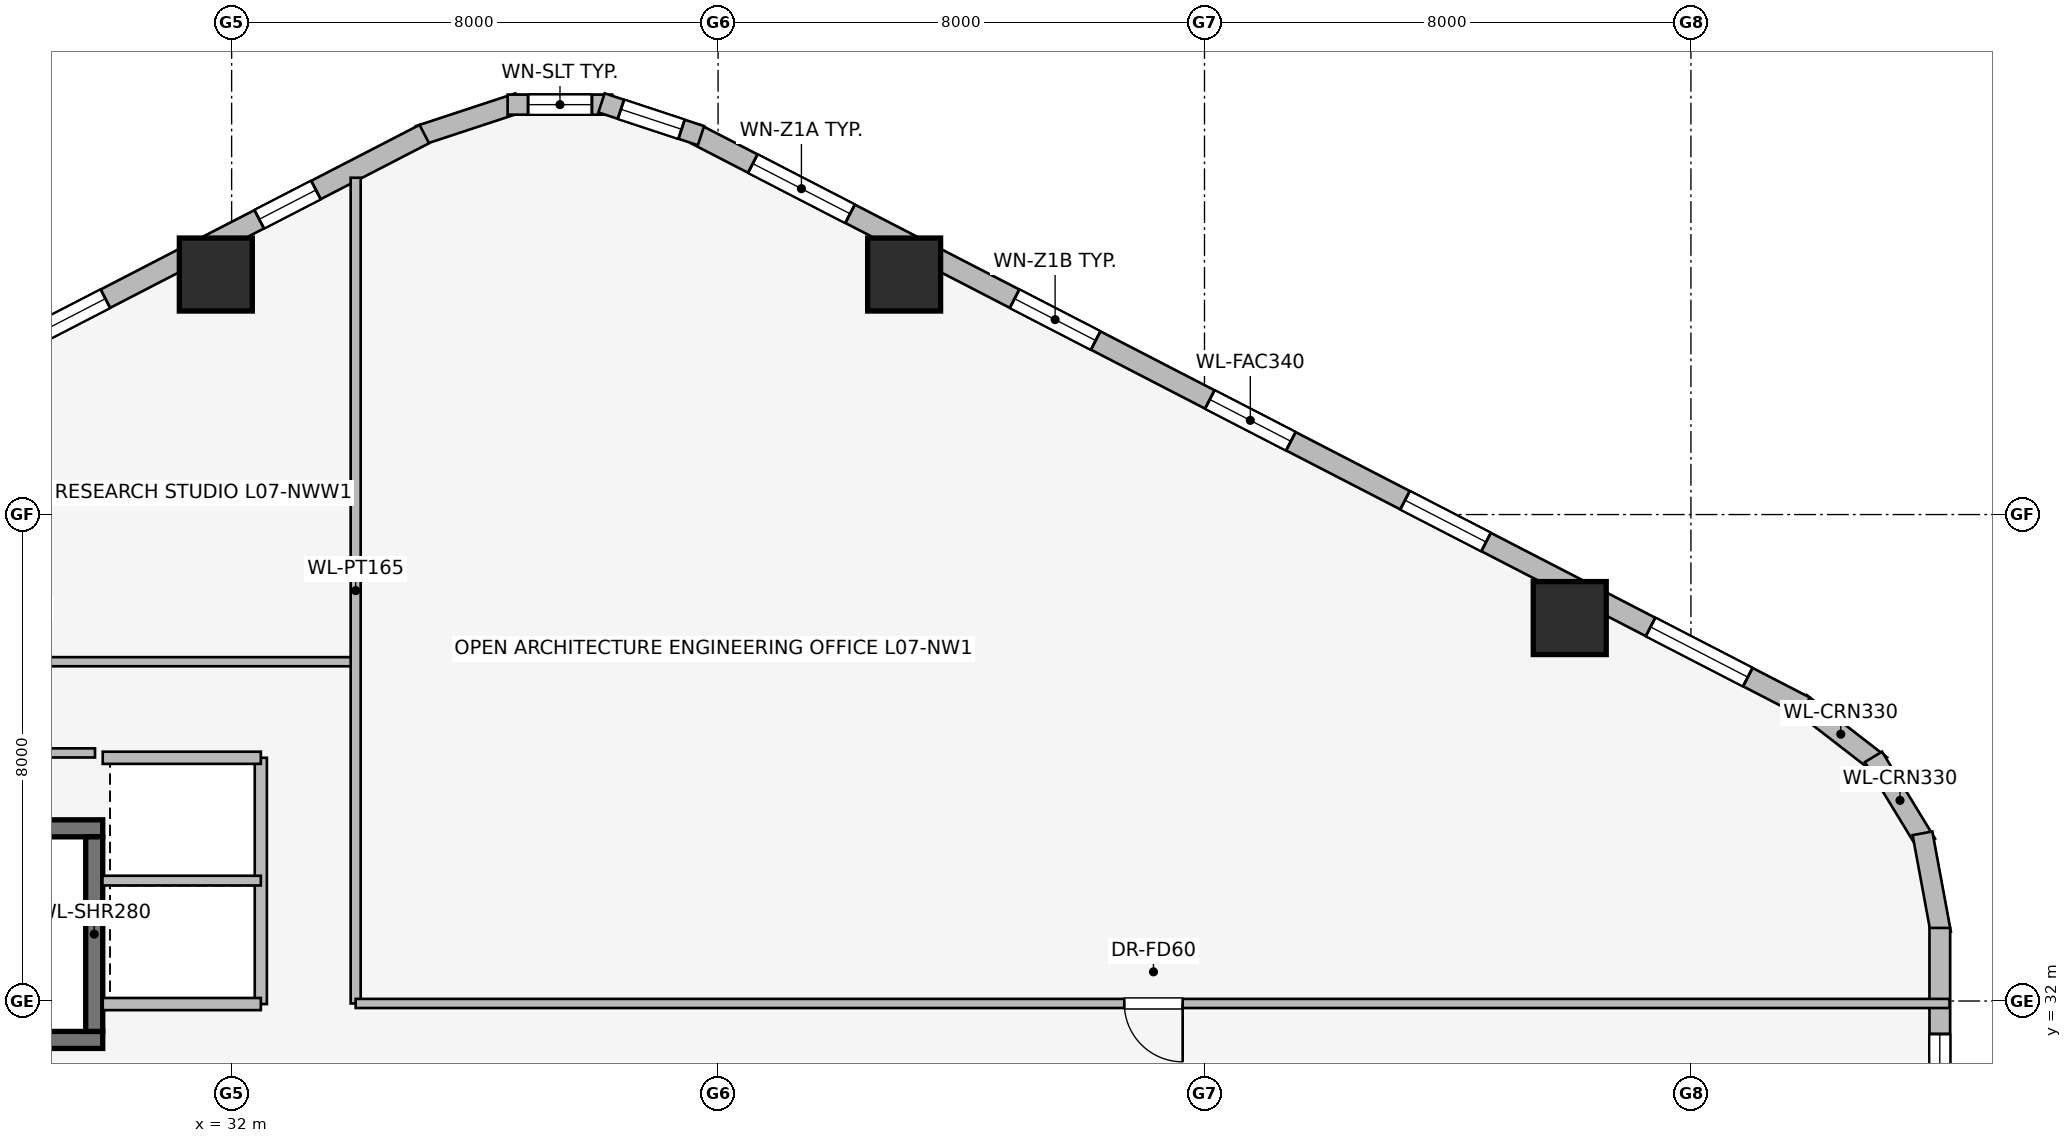
"""IFC4 building model, lengths in metres.
Left out: names, types, materials, properties, quantities, classifications, styles, units other than length and angle.
Written with IfcOpenShell. Run it as: python <this file> out.ifc"""

import sys

from ifc_helpers import new_model, si_unit, direction, frame, frame_2d, origin, origin_2d, place, context, subcontext, project, spatial, rectangle, extrude, element, fill, save


model = new_model("IFC4")
c1 = context("Model", 3, precision=1e-05, world=origin(), true_north=direction((0.0, 1.0)))
c2 = subcontext(c1, "Body", "Model", "MODEL_VIEW")
j1 = project(units=[si_unit("LENGTHUNIT", "METRE"), si_unit("PLANEANGLEUNIT", "RADIAN")], contexts=[c1])
p1 = place(None, origin())
s1 = spatial("IfcSite", under=j1, at=p1, CompositionType="ELEMENT")
p2 = place(p1, origin())
s2 = spatial("IfcBuilding", under=s1, at=p2, CompositionType="ELEMENT")
p3 = place(p2, frame((0.0, 0.0, 30.65)))
s3 = spatial("IfcBuildingStorey", under=s2, at=p3, CompositionType="ELEMENT", Elevation=30.65)
p4 = place(p3, frame((21.52, 31.36, 0.0), z_axis=(0.0, 0.0, 1.0), x_axis=(1.0, 0.0, 0.0)))
e1 = element("IfcWall", 1, at=p4, inside=s3, PredefinedType="SHEAR", context=c2, shape_type="SweptSolid", body=[
    extrude(rectangle(XDim=8.36, YDim=0.28, at=frame_2d((4.18, 0.0))), origin(), (0.0, 0.0, 1.0), 3.65),
])
p5 = place(p4, frame((0.45, 0.0, 0.0)))
e2 = element("IfcOpeningElement", 2, at=p5, cuts=e1, PredefinedType="OPENING", context=c2, shape_type="SweptSolid", body=[
    extrude(rectangle(XDim=1.05, YDim=2.0, at=frame_2d((0.525, 1.0))), frame((0.0, 0.15, 0.0), z_axis=(0.0, -1.0, 0.0), x_axis=(1.0, 0.0, 0.0)), (0.0, 0.0, 1.0), 0.3),
])
p6 = place(p3, frame((29.88, 34.84, 0.0), z_axis=(0.0, 0.0, 1.0), x_axis=(-1.0, 0.0, 0.0)))
e3 = element("IfcWall", 3, at=p6, inside=s3, PredefinedType="SHEAR", context=c2, shape_type="SweptSolid", body=[
    extrude(rectangle(XDim=8.36, YDim=0.28, at=frame_2d((4.18, 0.0))), origin(), (0.0, 0.0, 1.0), 3.65),
])
p7 = place(p3, frame((29.74, 31.5, 0.0), z_axis=(0.0, 0.0, 1.0), x_axis=(0.0, 1.0, 0.0)))
e4 = element("IfcWall", 4, at=p7, inside=s3, PredefinedType="SHEAR", context=c2, shape_type="SweptSolid", body=[
    extrude(rectangle(XDim=3.2, YDim=0.28, at=frame_2d((1.6, 0.0))), origin(), (0.0, 0.0, 1.0), 3.65),
])
for number, where, z_axis, x_axis in (
    (5, (54.007, 38.298, 0.0), (0.0, 0.0, 1.0), (1.0, 0.0, 0.0)),
    (6, (43.06, 43.947, 0.0), (0.0, 0.0, 1.0), (1.0, 0.0, 0.0)),
    (7, (31.74, 43.947, 0.0), (0.0, 0.0, 1.0), (1.0, 0.0, 0.0)),
):
    element("IfcColumn", number, at=place(p3, frame(where, z_axis=z_axis, x_axis=x_axis)), inside=s3, PredefinedType="COLUMN", context=c2, shape_type="SweptSolid", body=[
        extrude(rectangle(XDim=1.2, YDim=1.2, at=origin_2d()), origin(), (0.0, 0.0, 1.0), 3.65),
    ])
p8 = place(p3, frame((57.802, 36.901, 0.0), z_axis=(0.0, 0.0, 1.0), x_axis=(0.790691856293, -0.61221433207, 0.0)))
e8 = element("IfcWall", 8, at=p8, inside=s3, PredefinedType="STANDARD", context=c2, shape_type="SweptSolid", body=[
    extrude(rectangle(XDim=1.676, YDim=0.33, at=frame_2d((0.838, 0.0))), origin(), (0.0, 0.0, 1.0), 3.39),
])
p9 = place(p3, frame((59.002, 36.015, 0.0), z_axis=(0.0, 0.0, 1.0), x_axis=(0.520584129191, -0.853810379671, 0.0)))
e9 = element("IfcWall", 9, at=p9, inside=s3, PredefinedType="STANDARD", context=c2, shape_type="SweptSolid", body=[
    extrude(rectangle(XDim=1.677, YDim=0.33, at=frame_2d((0.838, 0.0))), origin(), (0.0, 0.0, 1.0), 3.39),
])
p10 = place(p3, frame((59.808, 34.758, 0.0), z_axis=(0.0, 0.0, 1.0), x_axis=(0.181714143354, -0.983351397063, 0.0)))
e10 = element("IfcWall", 10, at=p10, inside=s3, PredefinedType="STANDARD", context=c2, shape_type="SweptSolid", body=[
    extrude(rectangle(XDim=1.678, YDim=0.33, at=frame_2d((0.839, 0.0))), origin(), (0.0, 0.0, 1.0), 3.39),
])
p11 = place(p3, frame((39.631, 46.257, 0.0), z_axis=(0.0, 0.0, 1.0), x_axis=(0.888634413993, -0.458616264721, 0.0)))
e11 = element("IfcWall", 11, at=p11, inside=s3, PredefinedType="STANDARD", context=c2, shape_type="SweptSolid", body=[
    extrude(rectangle(XDim=20.531, YDim=0.34, at=frame_2d((10.266, 0.0))), origin(), (0.0, 0.0, 1.0), 2.684),
])
p12 = place(p11, frame((1.058, 0.0, 0.75)))
e12 = element("IfcOpeningElement", 12, at=p12, cuts=e11, PredefinedType="OPENING", context=c2, shape_type="SweptSolid", body=[
    extrude(rectangle(XDim=1.8, YDim=1.5, at=frame_2d((0.9, 0.75))), frame((0.0, 0.18, 0.0), z_axis=(0.0, -1.0, 0.0), x_axis=(1.0, 0.0, 0.0)), (0.0, 0.0, 1.0), 0.36),
])
p13 = place(p11, frame((5.903, 0.0, 0.75)))
e13 = element("IfcOpeningElement", 13, at=p13, cuts=e11, PredefinedType="OPENING", context=c2, shape_type="SweptSolid", body=[
    extrude(rectangle(XDim=1.5, YDim=1.5, at=frame_2d((0.75, 0.75))), frame((0.0, 0.18, 0.0), z_axis=(0.0, -1.0, 0.0), x_axis=(1.0, 0.0, 0.0)), (0.0, 0.0, 1.0), 0.36),
])
p14 = place(p11, frame((9.516, 0.0, 0.75)))
e14 = element("IfcOpeningElement", 14, at=p14, cuts=e11, PredefinedType="OPENING", context=c2, shape_type="SweptSolid", body=[
    extrude(rectangle(XDim=1.5, YDim=1.5, at=frame_2d((0.75, 0.75))), frame((0.0, 0.18, 0.0), z_axis=(0.0, -1.0, 0.0), x_axis=(1.0, 0.0, 0.0)), (0.0, 0.0, 1.0), 0.36),
])
p15 = place(p11, frame((13.129, 0.0, 0.75)))
e15 = element("IfcOpeningElement", 15, at=p15, cuts=e11, PredefinedType="OPENING", context=c2, shape_type="SweptSolid", body=[
    extrude(rectangle(XDim=1.5, YDim=1.5, at=frame_2d((0.75, 0.75))), frame((0.0, 0.18, 0.0), z_axis=(0.0, -1.0, 0.0), x_axis=(1.0, 0.0, 0.0)), (0.0, 0.0, 1.0), 0.36),
])
p16 = place(p11, frame((17.673, 0.0, 0.75)))
e16 = element("IfcOpeningElement", 16, at=p16, cuts=e11, PredefinedType="OPENING", context=c2, shape_type="SweptSolid", body=[
    extrude(rectangle(XDim=1.8, YDim=1.5, at=frame_2d((0.9, 0.75))), frame((0.0, 0.18, 0.0), z_axis=(0.0, -1.0, 0.0), x_axis=(1.0, 0.0, 0.0)), (0.0, 0.0, 1.0), 0.36),
])
p17 = place(p3, frame((35.081, 46.231, 0.0), z_axis=(0.0, 0.0, 1.0), x_axis=(0.94976901097, 0.312951794691, 0.0)))
e17 = element("IfcWall", 17, at=p17, inside=s3, PredefinedType="STANDARD", context=c2, shape_type="SweptSolid", body=[
    extrude(rectangle(XDim=1.722, YDim=0.33, at=frame_2d((0.861, 0.0))), origin(), (0.0, 0.0, 1.0), 3.39),
])
p18 = place(p3, frame((36.539, 46.741, 0.0), z_axis=(0.0, 0.0, 1.0), x_axis=(1.0, 0.0, 0.0)))
e18 = element("IfcWall", 18, at=p18, inside=s3, PredefinedType="STANDARD", context=c2, shape_type="SweptSolid", body=[
    extrude(rectangle(XDim=1.722, YDim=0.33, at=frame_2d((0.861, 0.0))), origin(), (0.0, 0.0, 1.0), 3.39),
])
p19 = place(p18, frame((0.336, 0.0, 0.75)))
e19 = element("IfcOpeningElement", 19, at=p19, cuts=e18, PredefinedType="OPENING", context=c2, shape_type="SweptSolid", body=[
    extrude(rectangle(XDim=1.05, YDim=1.4, at=frame_2d((0.525, 0.7))), frame((0.0, 0.175, 0.0), z_axis=(0.0, -1.0, 0.0), x_axis=(1.0, 0.0, 0.0)), (0.0, 0.0, 1.0), 0.35),
])
p20 = place(p3, frame((38.083, 46.77, 0.0), z_axis=(0.0, 0.0, 1.0), x_axis=(0.94976901097, -0.312951794691, 0.0)))
e20 = element("IfcWall", 20, at=p20, inside=s3, PredefinedType="STANDARD", context=c2, shape_type="SweptSolid", body=[
    extrude(rectangle(XDim=1.722, YDim=0.33, at=frame_2d((0.861, 0.0))), origin(), (0.0, 0.0, 1.0), 3.39),
])
p21 = place(p20, frame((0.336, 0.0, 0.75)))
e21 = element("IfcOpeningElement", 21, at=p21, cuts=e20, PredefinedType="OPENING", context=c2, shape_type="SweptSolid", body=[
    extrude(rectangle(XDim=1.05, YDim=1.4, at=frame_2d((0.525, 0.7))), frame((0.0, 0.175, 0.0), z_axis=(0.0, -1.0, 0.0), x_axis=(1.0, 0.0, 0.0)), (0.0, 0.0, 1.0), 0.35),
])
p22 = place(p3, frame((16.924, 36.841, 0.0), z_axis=(0.0, 0.0, 1.0), x_axis=(0.888634413993, 0.458616264721, 0.0)))
e22 = element("IfcWall", 22, at=p22, inside=s3, PredefinedType="STANDARD", context=c2, shape_type="SweptSolid", body=[
    extrude(rectangle(XDim=20.531, YDim=0.34, at=frame_2d((10.266, 0.0))), origin(), (0.0, 0.0, 1.0), 2.684),
])
p23 = place(p22, frame((2.161, 0.0, 0.75)))
e23 = element("IfcOpeningElement", 23, at=p23, cuts=e22, PredefinedType="OPENING", context=c2, shape_type="SweptSolid", body=[
    extrude(rectangle(XDim=1.05, YDim=1.4, at=frame_2d((0.525, 0.7))), frame((0.0, 0.18, 0.0), z_axis=(0.0, -1.0, 0.0), x_axis=(1.0, 0.0, 0.0)), (0.0, 0.0, 1.0), 0.36),
])
p24 = place(p22, frame((5.903, 0.0, 0.75)))
e24 = element("IfcOpeningElement", 24, at=p24, cuts=e22, PredefinedType="OPENING", context=c2, shape_type="SweptSolid", body=[
    extrude(rectangle(XDim=1.5, YDim=1.5, at=frame_2d((0.75, 0.75))), frame((0.0, 0.18, 0.0), z_axis=(0.0, -1.0, 0.0), x_axis=(1.0, 0.0, 0.0)), (0.0, 0.0, 1.0), 0.36),
])
p25 = place(p22, frame((9.516, 0.0, 0.75)))
e25 = element("IfcOpeningElement", 25, at=p25, cuts=e22, PredefinedType="OPENING", context=c2, shape_type="SweptSolid", body=[
    extrude(rectangle(XDim=1.5, YDim=1.5, at=frame_2d((0.75, 0.75))), frame((0.0, 0.18, 0.0), z_axis=(0.0, -1.0, 0.0), x_axis=(1.0, 0.0, 0.0)), (0.0, 0.0, 1.0), 0.36),
])
p26 = place(p22, frame((13.129, 0.0, 0.75)))
e26 = element("IfcOpeningElement", 26, at=p26, cuts=e22, PredefinedType="OPENING", context=c2, shape_type="SweptSolid", body=[
    extrude(rectangle(XDim=1.5, YDim=1.5, at=frame_2d((0.75, 0.75))), frame((0.0, 0.18, 0.0), z_axis=(0.0, -1.0, 0.0), x_axis=(1.0, 0.0, 0.0)), (0.0, 0.0, 1.0), 0.36),
])
p27 = place(p22, frame((17.476, 0.0, 0.75)))
e27 = element("IfcOpeningElement", 27, at=p27, cuts=e22, PredefinedType="OPENING", context=c2, shape_type="SweptSolid", body=[
    extrude(rectangle(XDim=1.05, YDim=1.4, at=frame_2d((0.525, 0.7))), frame((0.0, 0.18, 0.0), z_axis=(0.0, -1.0, 0.0), x_axis=(1.0, 0.0, 0.0)), (0.0, 0.0, 1.0), 0.36),
])
p28 = place(p3, frame((60.093, 33.202, 0.0), z_axis=(0.0, 0.0, 1.0), x_axis=(0.0, -1.0, 0.0)))
e28 = element("IfcWall", 28, at=p28, inside=s3, PredefinedType="STANDARD", context=c2, shape_type="SweptSolid", body=[
    extrude(rectangle(XDim=18.404, YDim=0.34, at=frame_2d((9.202, 0.0))), origin(), (0.0, 0.0, 1.0), 2.684),
])
p29 = place(p28, frame((1.744, 0.0, 0.75)))
e29 = element("IfcOpeningElement", 29, at=p29, cuts=e28, PredefinedType="OPENING", context=c2, shape_type="SweptSolid", body=[
    extrude(rectangle(XDim=1.05, YDim=1.4, at=frame_2d((0.525, 0.7))), frame((0.0, 0.18, 0.0), z_axis=(0.0, -1.0, 0.0), x_axis=(1.0, 0.0, 0.0)), (0.0, 0.0, 1.0), 0.36),
])
p30 = place(p28, frame((5.265, 0.0, 0.75)))
e30 = element("IfcOpeningElement", 30, at=p30, cuts=e28, PredefinedType="OPENING", context=c2, shape_type="SweptSolid", body=[
    extrude(rectangle(XDim=1.5, YDim=1.5, at=frame_2d((0.75, 0.75))), frame((0.0, 0.18, 0.0), z_axis=(0.0, -1.0, 0.0), x_axis=(1.0, 0.0, 0.0)), (0.0, 0.0, 1.0), 0.36),
])
p31 = place(p28, frame((8.452, 0.0, 0.75)))
e31 = element("IfcOpeningElement", 31, at=p31, cuts=e28, PredefinedType="OPENING", context=c2, shape_type="SweptSolid", body=[
    extrude(rectangle(XDim=1.5, YDim=1.5, at=frame_2d((0.75, 0.75))), frame((0.0, 0.18, 0.0), z_axis=(0.0, -1.0, 0.0), x_axis=(1.0, 0.0, 0.0)), (0.0, 0.0, 1.0), 0.36),
])
p32 = place(p28, frame((11.639, 0.0, 0.75)))
e32 = element("IfcOpeningElement", 32, at=p32, cuts=e28, PredefinedType="OPENING", context=c2, shape_type="SweptSolid", body=[
    extrude(rectangle(XDim=1.5, YDim=1.5, at=frame_2d((0.75, 0.75))), frame((0.0, 0.18, 0.0), z_axis=(0.0, -1.0, 0.0), x_axis=(1.0, 0.0, 0.0)), (0.0, 0.0, 1.0), 0.36),
])
p33 = place(p28, frame((15.65, 0.0, 0.75)))
e33 = element("IfcOpeningElement", 33, at=p33, cuts=e28, PredefinedType="OPENING", context=c2, shape_type="SweptSolid", body=[
    extrude(rectangle(XDim=1.05, YDim=1.4, at=frame_2d((0.525, 0.7))), frame((0.0, 0.18, 0.0), z_axis=(0.0, -1.0, 0.0), x_axis=(1.0, 0.0, 0.0)), (0.0, 0.0, 1.0), 0.36),
])
p34 = place(p3, frame((32.48, 31.95, 0.0), z_axis=(0.0, 0.0, 1.0), x_axis=(0.0, 1.0, 0.0)))
e34 = element("IfcWall", 34, at=p34, inside=s3, PredefinedType="PARTITIONING", context=c2, shape_type="SweptSolid", body=[
    extrude(rectangle(XDim=4.05, YDim=0.2, at=frame_2d((2.025, 0.0))), origin(), (0.0, 0.0, 1.0), 2.513),
])
for number, where, z_axis, x_axis in (
    (35, (29.88, 36.0, 0.0), (0.0, 0.0, 1.0), (1.0, 0.0, 0.0)),
    (36, (32.48, 31.95, 0.0), (0.0, 0.0, 1.0), (-1.0, 0.0, 0.0)),
):
    element("IfcWall", number, at=place(p3, frame(where, z_axis=z_axis, x_axis=x_axis)), inside=s3, PredefinedType="PARTITIONING", context=c2, shape_type="SweptSolid", body=[
        extrude(rectangle(XDim=2.6, YDim=0.2, at=frame_2d((1.3, 0.0))), origin(), (0.0, 0.0, 1.0), 3.39),
    ])
p35 = place(p3, frame((29.875, 33.98, 0.0), z_axis=(0.0, 0.0, 1.0), x_axis=(1.0, 0.0, 0.0)))
e37 = element("IfcWall", 37, at=p35, inside=s3, PredefinedType="PARTITIONING", context=c2, shape_type="SweptSolid", body=[
    extrude(rectangle(XDim=2.605, YDim=0.16, at=frame_2d((1.302, 0.0))), origin(), (0.0, 0.0, 1.0), 3.39),
])
p36 = place(p3, frame((34.0, 37.58, 0.0), z_axis=(0.0, 0.0, 1.0), x_axis=(-1.0, 0.0, 0.0)))
e38 = element("IfcWall", 38, at=p36, inside=s3, PredefinedType="PARTITIONING", context=c2, shape_type="SweptSolid", body=[
    extrude(rectangle(XDim=15.6, YDim=0.15, at=frame_2d((7.8, 0.0))), origin(), (0.0, 0.0, 1.0), 3.39),
])
p37 = place(p36, frame((5.195, 0.0, 0.0)))
e39 = element("IfcOpeningElement", 39, at=p37, cuts=e38, PredefinedType="OPENING", context=c2, shape_type="SweptSolid", body=[
    extrude(rectangle(XDim=0.96, YDim=2.0, at=frame_2d((0.48, 1.0))), frame((0.0, 0.085, 0.0), z_axis=(0.0, -1.0, 0.0), x_axis=(1.0, 0.0, 0.0)), (0.0, 0.0, 1.0), 0.17),
])
p38 = place(p3, frame((34.04, 31.96, 0.0), z_axis=(0.0, 0.0, 1.0), x_axis=(0.0, 1.0, 0.0)))
e40 = element("IfcWall", 40, at=p38, inside=s3, PredefinedType="PARTITIONING", context=c2, shape_type="SweptSolid", body=[
    extrude(rectangle(XDim=13.579, YDim=0.165, at=frame_2d((6.79, 0.0))), origin(), (0.0, 0.0, 1.0), 3.39),
])
p39 = place(p3, frame((60.253, 31.96, 0.0), z_axis=(0.0, 0.0, 1.0), x_axis=(-1.0, 0.0, 0.0)))
e41 = element("IfcWall", 41, at=p39, inside=s3, PredefinedType="PARTITIONING", context=c2, shape_type="SweptSolid", body=[
    extrude(rectangle(XDim=26.213, YDim=0.15, at=frame_2d((13.106, 0.0))), origin(), (0.0, 0.0, 1.0), 3.39),
])
p40 = place(p39, frame((12.612, 0.0, 0.0)))
e42 = element("IfcOpeningElement", 42, at=p40, cuts=e41, PredefinedType="OPENING", context=c2, shape_type="SweptSolid", body=[
    extrude(rectangle(XDim=0.96, YDim=2.0, at=frame_2d((0.48, 1.0))), frame((0.0, 0.085, 0.0), z_axis=(0.0, -1.0, 0.0), x_axis=(1.0, 0.0, 0.0)), (0.0, 0.0, 1.0), 0.17),
])
p41 = place(p3, frame((29.753, 36.08, 0.0), z_axis=(0.0, 0.0, 1.0), x_axis=(-1.0, 0.0, 0.0)))
e43 = element("IfcWall", 43, at=p41, inside=s3, PredefinedType="PARTITIONING", context=c2, shape_type="SweptSolid", body=[
    extrude(rectangle(XDim=7.353, YDim=0.15, at=frame_2d((3.677, 0.0))), origin(), (0.0, 0.0, 1.0), 3.39),
])
p42 = place(p12, origin())
e44 = element("IfcWindow", 44, at=p42, inside=s3, PartitioningType="SINGLE_PANEL", PredefinedType="WINDOW", context=c2, shape_type="SweptSolid", body=[
    extrude(rectangle(XDim=1.8, YDim=1.5, at=frame_2d((0.9, 0.75))), frame((0.0, 0.03, 0.0), z_axis=(0.0, -1.0, 0.0), x_axis=(1.0, 0.0, 0.0)), (0.0, 0.0, 1.0), 0.06),
])
fill(e12, e44)
p43 = place(p13, origin())
e45 = element("IfcWindow", 45, at=p43, inside=s3, PartitioningType="SINGLE_PANEL", PredefinedType="WINDOW", context=c2, shape_type="SweptSolid", body=[
    extrude(rectangle(XDim=1.5, YDim=1.5, at=frame_2d((0.75, 0.75))), frame((0.0, 0.03, 0.0), z_axis=(0.0, -1.0, 0.0), x_axis=(1.0, 0.0, 0.0)), (0.0, 0.0, 1.0), 0.06),
])
fill(e13, e45)
p44 = place(p14, origin())
e46 = element("IfcWindow", 46, at=p44, inside=s3, PartitioningType="SINGLE_PANEL", PredefinedType="WINDOW", context=c2, shape_type="SweptSolid", body=[
    extrude(rectangle(XDim=1.5, YDim=1.5, at=frame_2d((0.75, 0.75))), frame((0.0, 0.03, 0.0), z_axis=(0.0, -1.0, 0.0), x_axis=(1.0, 0.0, 0.0)), (0.0, 0.0, 1.0), 0.06),
])
fill(e14, e46)
p45 = place(p15, origin())
e47 = element("IfcWindow", 47, at=p45, inside=s3, PartitioningType="SINGLE_PANEL", PredefinedType="WINDOW", context=c2, shape_type="SweptSolid", body=[
    extrude(rectangle(XDim=1.5, YDim=1.5, at=frame_2d((0.75, 0.75))), frame((0.0, 0.03, 0.0), z_axis=(0.0, -1.0, 0.0), x_axis=(1.0, 0.0, 0.0)), (0.0, 0.0, 1.0), 0.06),
])
fill(e15, e47)
p46 = place(p16, origin())
e48 = element("IfcWindow", 48, at=p46, inside=s3, PartitioningType="SINGLE_PANEL", PredefinedType="WINDOW", context=c2, shape_type="SweptSolid", body=[
    extrude(rectangle(XDim=1.8, YDim=1.5, at=frame_2d((0.9, 0.75))), frame((0.0, 0.03, 0.0), z_axis=(0.0, -1.0, 0.0), x_axis=(1.0, 0.0, 0.0)), (0.0, 0.0, 1.0), 0.06),
])
fill(e16, e48)
p47 = place(p19, origin())
e49 = element("IfcWindow", 49, at=p47, inside=s3, PartitioningType="SINGLE_PANEL", PredefinedType="WINDOW", context=c2, shape_type="SweptSolid", body=[
    extrude(rectangle(XDim=1.05, YDim=1.4, at=frame_2d((0.525, 0.7))), frame((0.0, 0.03, 0.0), z_axis=(0.0, -1.0, 0.0), x_axis=(1.0, 0.0, 0.0)), (0.0, 0.0, 1.0), 0.06),
])
fill(e19, e49)
p48 = place(p21, origin())
e50 = element("IfcWindow", 50, at=p48, inside=s3, PartitioningType="SINGLE_PANEL", PredefinedType="WINDOW", context=c2, shape_type="SweptSolid", body=[
    extrude(rectangle(XDim=1.05, YDim=1.4, at=frame_2d((0.525, 0.7))), frame((0.0, 0.03, 0.0), z_axis=(0.0, -1.0, 0.0), x_axis=(1.0, 0.0, 0.0)), (0.0, 0.0, 1.0), 0.06),
])
fill(e21, e50)
p49 = place(p26, origin())
e51 = element("IfcWindow", 51, at=p49, inside=s3, PartitioningType="SINGLE_PANEL", PredefinedType="WINDOW", context=c2, shape_type="SweptSolid", body=[
    extrude(rectangle(XDim=1.5, YDim=1.5, at=frame_2d((0.75, 0.75))), frame((0.0, 0.03, 0.0), z_axis=(0.0, -1.0, 0.0), x_axis=(1.0, 0.0, 0.0)), (0.0, 0.0, 1.0), 0.06),
])
fill(e26, e51)
p50 = place(p27, origin())
e52 = element("IfcWindow", 52, at=p50, inside=s3, PartitioningType="SINGLE_PANEL", PredefinedType="WINDOW", context=c2, shape_type="SweptSolid", body=[
    extrude(rectangle(XDim=1.05, YDim=1.4, at=frame_2d((0.525, 0.7))), frame((0.0, 0.03, 0.0), z_axis=(0.0, -1.0, 0.0), x_axis=(1.0, 0.0, 0.0)), (0.0, 0.0, 1.0), 0.06),
])
fill(e27, e52)
p51 = place(p29, origin())
e53 = element("IfcWindow", 53, at=p51, inside=s3, PartitioningType="SINGLE_PANEL", PredefinedType="WINDOW", context=c2, shape_type="SweptSolid", body=[
    extrude(rectangle(XDim=1.05, YDim=1.4, at=frame_2d((0.525, 0.7))), frame((0.0, 0.03, 0.0), z_axis=(0.0, -1.0, 0.0), x_axis=(1.0, 0.0, 0.0)), (0.0, 0.0, 1.0), 0.06),
])
fill(e29, e53)
p52 = place(p40, origin())
e54 = element("IfcDoor", 54, at=p52, inside=s3, OperationType="SINGLE_SWING_LEFT", PredefinedType="DOOR", context=c2, shape_type="SweptSolid", body=[
    extrude(rectangle(XDim=0.96, YDim=2.0, at=frame_2d((0.48, 1.0))), frame((0.0, 0.025, 0.0), z_axis=(0.0, -1.0, 0.0), x_axis=(1.0, 0.0, 0.0)), (0.0, 0.0, 1.0), 0.05),
])
fill(e42, e54)
save(model, sys.argv[1])
